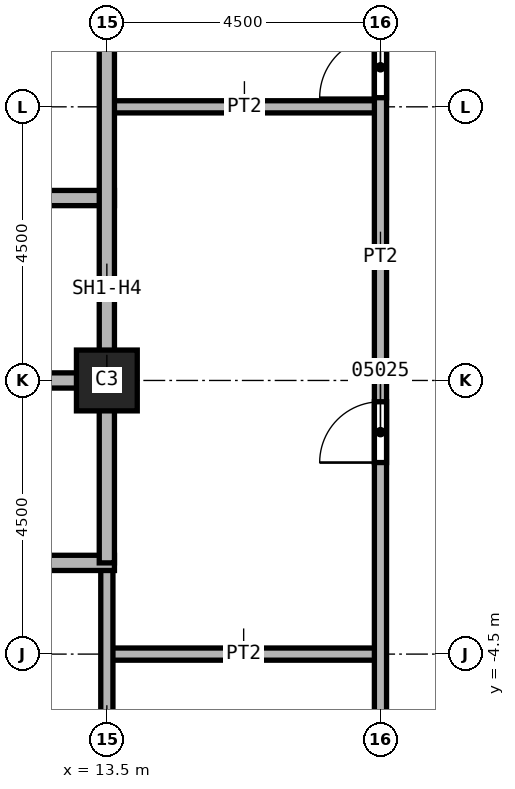
"""IFC4 building model, lengths in metres.
Left out: names, types, materials, properties, quantities, classifications, styles, units other than length and angle.
Written with IfcOpenShell. Run it as: python <this file> out.ifc"""

import sys

from ifc_helpers import new_model, si_unit, direction, frame, frame_2d, origin, origin_2d, place, context, subcontext, project, spatial, rectangle, extrude, element, fill, save


model = new_model("IFC4")
c1 = context("Model", 3, precision=1e-05, world=origin(), true_north=direction((0.0, 1.0)))
c2 = subcontext(c1, "Body", "Model", "MODEL_VIEW")
j1 = project(units=[si_unit("LENGTHUNIT", "METRE"), si_unit("PLANEANGLEUNIT", "RADIAN")], contexts=[c1])
p1 = place(None, origin())
s1 = spatial("IfcSite", under=j1, at=p1, CompositionType="ELEMENT")
p2 = place(p1, origin())
s2 = spatial("IfcBuilding", under=s1, at=p2, CompositionType="ELEMENT")
p3 = place(p2, frame((0.0, 0.0, 116.0)))
s3 = spatial("IfcBuildingStorey", under=s2, at=p3, CompositionType="ELEMENT", Elevation=116.0)
p4 = place(p3, frame((13.5, 0.0, 0.0), z_axis=(0.0, 0.0, 1.0), x_axis=(1.0, 0.0, 0.0)))
e1 = element("IfcColumn", 1, at=p4, inside=s3, PredefinedType="COLUMN", context=c2, shape_type="SweptSolid", body=[
    extrude(rectangle(XDim=1.0, YDim=1.0, at=origin_2d()), origin(), (0.0, 0.0, 1.0), 3.6),
])
for number, where, z_axis, x_axis in (
    (2, (13.5, -4.5, 0.0), (0.0, 0.0, 1.0), (1.0, 0.0, 0.0)),
    (3, (13.5, 4.5, 0.0), (0.0, 0.0, 1.0), (1.0, 0.0, 0.0)),
):
    element("IfcWall", number, at=place(p3, frame(where, z_axis=z_axis, x_axis=x_axis)), inside=s3, PredefinedType="PARTITIONING", context=c2, shape_type="SweptSolid", body=[
        extrude(rectangle(XDim=4.5, YDim=0.2, at=frame_2d((2.25, 0.0))), origin(), (0.0, 0.0, 1.0), 3.6),
    ])
p5 = place(p3, frame((18.0, -9.1, 0.0), z_axis=(0.0, 0.0, 1.0), x_axis=(0.0, 1.0, 0.0)))
e4 = element("IfcWall", 4, at=p5, inside=s3, PredefinedType="PARTITIONING", context=c2, shape_type="SweptSolid", body=[
    extrude(rectangle(XDim=18.2, YDim=0.2, at=frame_2d((9.1, 0.0))), origin(), (0.0, 0.0, 1.0), 3.6),
])
p6 = place(p5, frame((1.9, 0.0, 0.0)))
e5 = element("IfcOpeningElement", 5, at=p6, cuts=e4, PredefinedType="OPENING", context=c2, shape_type="SweptSolid", body=[
    extrude(rectangle(XDim=1.0, YDim=2.1, at=frame_2d((0.5, 1.05))), frame((0.0, 0.1, 0.0), z_axis=(0.0, -1.0, 0.0), x_axis=(1.0, 0.0, 0.0)), (0.0, 0.0, 1.0), 0.2),
])
p7 = place(p5, frame((7.75, 0.0, 0.0)))
e6 = element("IfcOpeningElement", 6, at=p7, cuts=e4, PredefinedType="OPENING", context=c2, shape_type="SweptSolid", body=[
    extrude(rectangle(XDim=1.0, YDim=2.1, at=frame_2d((0.5, 1.05))), frame((0.0, 0.1, 0.0), z_axis=(0.0, -1.0, 0.0), x_axis=(1.0, 0.0, 0.0)), (0.0, 0.0, 1.0), 0.2),
])
p8 = place(p5, frame((13.75, 0.0, 0.0)))
e7 = element("IfcOpeningElement", 7, at=p8, cuts=e4, PredefinedType="OPENING", context=c2, shape_type="SweptSolid", body=[
    extrude(rectangle(XDim=1.0, YDim=2.1, at=frame_2d((0.5, 1.05))), frame((0.0, 0.1, 0.0), z_axis=(0.0, -1.0, 0.0), x_axis=(1.0, 0.0, 0.0)), (0.0, 0.0, 1.0), 0.2),
])
p9 = place(p3, frame((13.5, -3.0, 0.0), z_axis=(0.0, 0.0, 1.0), x_axis=(0.0, -1.0, 0.0)))
e8 = element("IfcWall", 8, at=p9, inside=s3, PredefinedType="SOLIDWALL", context=c2, shape_type="SweptSolid", body=[
    extrude(rectangle(XDim=4.0, YDim=0.2, at=frame_2d((2.0, 0.0))), origin(), (0.0, 0.0, 1.0), 2.838),
])
p10 = place(p3, frame((4.375, 3.0, 0.0), z_axis=(0.0, 0.0, 1.0), x_axis=(1.0, 0.0, 0.0)))
e9 = element("IfcWall", 9, at=p10, inside=s3, PredefinedType="SOLIDWALL", context=c2, shape_type="SweptSolid", body=[
    extrude(rectangle(XDim=9.25, YDim=0.25, at=frame_2d((4.625, 0.0))), origin(), (0.0, 0.0, 1.0), 3.6),
])
p11 = place(p10, frame((4.125, 0.0, 0.0)))
e10 = element("IfcOpeningElement", 10, at=p11, cuts=e9, PredefinedType="OPENING", context=c2, shape_type="SweptSolid", body=[
    extrude(rectangle(XDim=1.1, YDim=2.1, at=frame_2d((0.55, 1.05))), frame((0.0, 0.125, 0.0), z_axis=(0.0, -1.0, 0.0), x_axis=(1.0, 0.0, 0.0)), (0.0, 0.0, 1.0), 0.25),
])
p12 = place(p3, frame((7.5, -3.0, 0.0), z_axis=(0.0, 0.0, 1.0), x_axis=(1.0, 0.0, 0.0)))
e11 = element("IfcWall", 11, at=p12, inside=s3, PredefinedType="SOLIDWALL", context=c2, shape_type="SweptSolid", body=[
    extrude(rectangle(XDim=6.125, YDim=0.25, at=frame_2d((3.062, 0.0))), origin(), (0.0, 0.0, 1.0), 3.6),
])
p13 = place(p12, frame((1.0, 0.0, 0.0)))
e12 = element("IfcOpeningElement", 12, at=p13, cuts=e11, PredefinedType="OPENING", context=c2, shape_type="SweptSolid", body=[
    extrude(rectangle(XDim=1.1, YDim=2.1, at=frame_2d((0.55, 1.05))), frame((0.0, 0.125, 0.0), z_axis=(0.0, -1.0, 0.0), x_axis=(1.0, 0.0, 0.0)), (0.0, 0.0, 1.0), 0.25),
])
p14 = place(p3, frame((10.5, 0.0, 0.0), z_axis=(0.0, 0.0, 1.0), x_axis=(1.0, 0.0, 0.0)))
e13 = element("IfcWall", 13, at=p14, inside=s3, PredefinedType="SOLIDWALL", context=c2, shape_type="SweptSolid", body=[
    extrude(rectangle(XDim=3.125, YDim=0.25, at=frame_2d((1.562, 0.0))), origin(), (0.0, 0.0, 1.0), 3.6),
])
p15 = place(p3, frame((13.5, 6.0, 0.0), z_axis=(0.0, 0.0, 1.0), x_axis=(0.0, -1.0, 0.0)))
e14 = element("IfcWall", 14, at=p15, inside=s3, PredefinedType="SOLIDWALL", context=c2, shape_type="SweptSolid", body=[
    extrude(rectangle(XDim=9.0, YDim=0.25, at=frame_2d((4.5, 0.0))), origin(), (0.0, 0.0, 1.0), 2.838),
])
p16 = place(p7, origin())
e15 = element("IfcDoor", 15, at=p16, inside=s3, OperationType="SINGLE_SWING_RIGHT", PredefinedType="DOOR", context=c2, shape_type="SweptSolid", body=[
    extrude(rectangle(XDim=1.0, YDim=2.1, at=frame_2d((0.5, 1.05))), frame((0.0, 0.025, 0.0), z_axis=(0.0, -1.0, 0.0), x_axis=(1.0, 0.0, 0.0)), (0.0, 0.0, 1.0), 0.05),
])
fill(e6, e15)
p17 = place(p8, origin())
e16 = element("IfcDoor", 16, at=p17, inside=s3, OperationType="SINGLE_SWING_LEFT", PredefinedType="DOOR", context=c2, shape_type="SweptSolid", body=[
    extrude(rectangle(XDim=1.0, YDim=2.1, at=frame_2d((0.5, 1.05))), frame((0.0, 0.025, 0.0), z_axis=(0.0, -1.0, 0.0), x_axis=(1.0, 0.0, 0.0)), (0.0, 0.0, 1.0), 0.05),
])
fill(e7, e16)
save(model, sys.argv[1])
